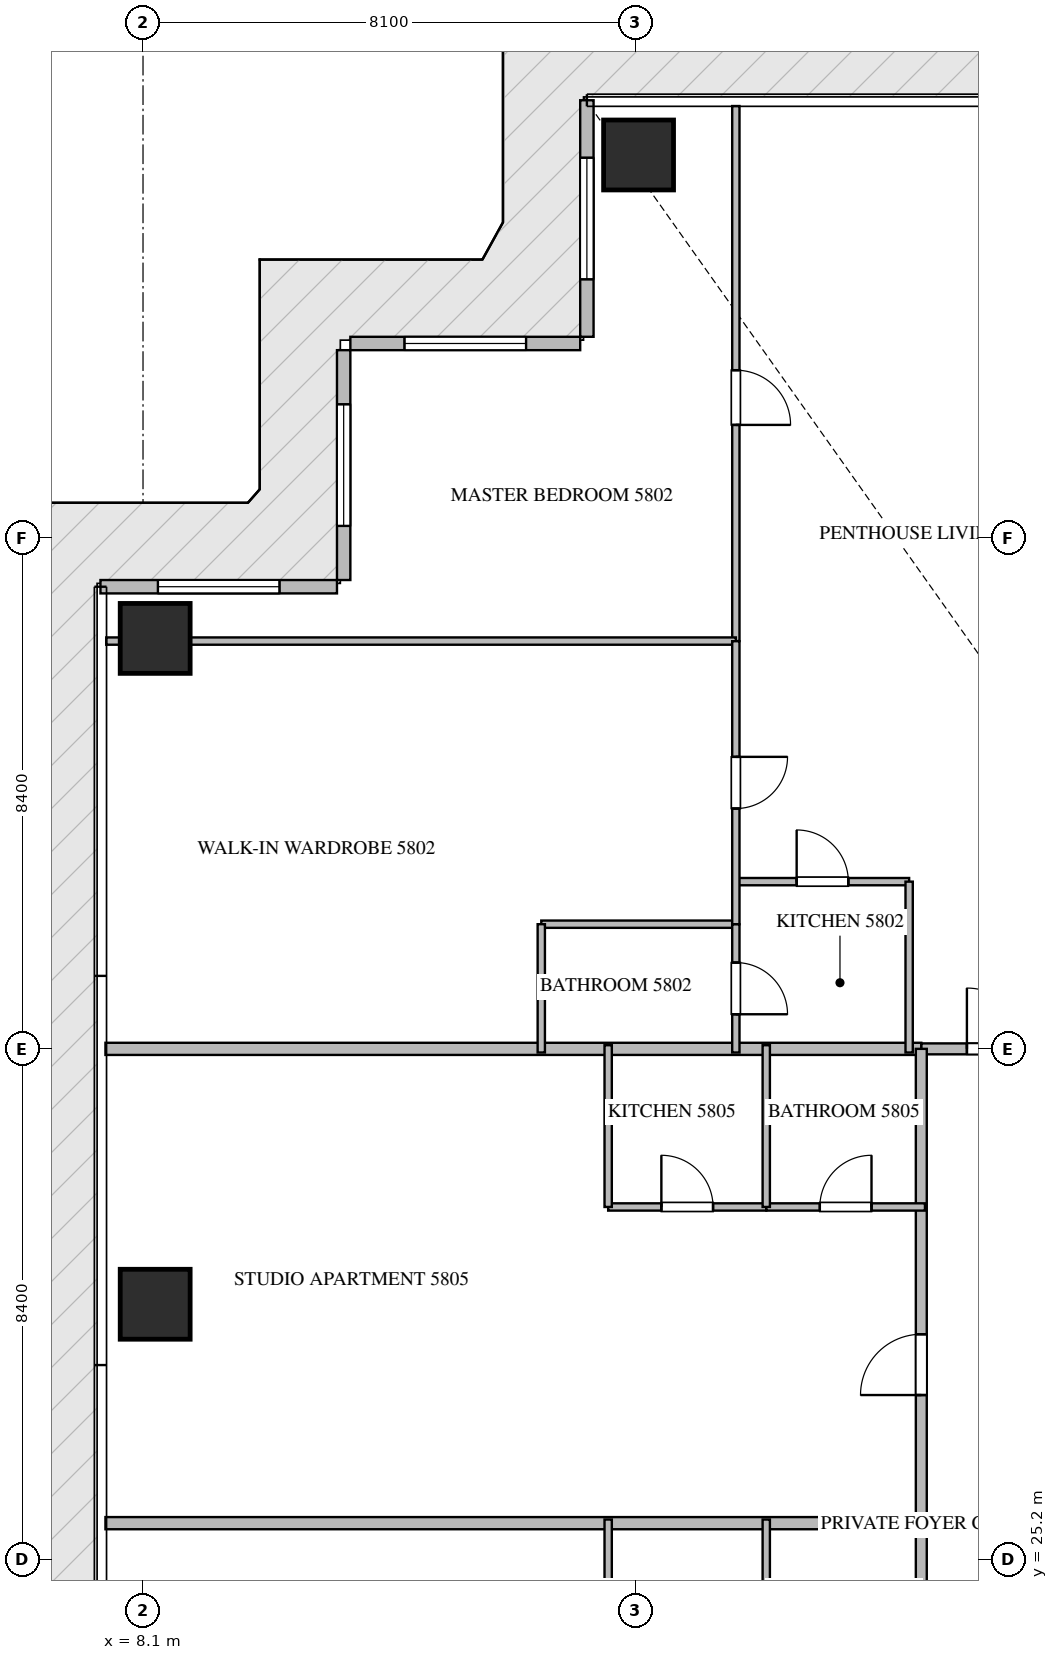
"""IFC4 building model, lengths in metres.
Left out: names, types, materials, properties, quantities, classifications, styles, units other than length and angle.
Written with IfcOpenShell. Run it as: python <this file> out.ifc"""

import sys

from ifc_helpers import new_model, si_unit, direction, frame, frame_2d, origin, origin_2d, place, context, subcontext, project, spatial, rectangle, extrude, source, transform, mapped, element, fill, save


model = new_model("IFC4")
c1 = context("Model", 3, precision=1e-05, world=origin(), true_north=direction((0.0, 1.0)))
c2 = subcontext(c1, "Body", "Model", "MODEL_VIEW")
j1 = project(units=[si_unit("LENGTHUNIT", "METRE"), si_unit("PLANEANGLEUNIT", "RADIAN")], contexts=[c1])
p1 = place(None, origin())
s1 = spatial("IfcSite", under=j1, at=p1, CompositionType="ELEMENT")
p2 = place(p1, origin())
s2 = spatial("IfcBuilding", under=s1, at=p2, CompositionType="ELEMENT")
p3 = place(p2, frame((0.0, 0.0, 233.55)))
s3 = spatial("IfcBuildingStorey", under=s2, at=p3, CompositionType="ELEMENT", Elevation=233.55)
m1 = source(origin(), c2, "Body", "SweptSolid", [
    extrude(rectangle(XDim=1.15, YDim=1.15, at=origin_2d()), origin(), (0.0, 0.0, 1.0), 3.85),
])
for number, where, z_axis, x_axis in (
    (1, (16.25, 48.3, -0.26), (0.0, 0.0, 1.0), (1.0, 0.0, 0.0)),
    (2, (8.3, 29.4, -0.26), (0.0, 0.0, 1.0), (1.0, 0.0, 0.0)),
    (3, (8.3, 40.35, -0.26), (0.0, 0.0, 1.0), (1.0, 0.0, 0.0)),
):
    element("IfcColumn", number, at=place(p3, frame(where, z_axis=z_axis, x_axis=x_axis)), inside=s3, PredefinedType="COLUMN", context=c2, shape_type="MappedRepresentation", body=[
        mapped(m1, transform((0.0, 0.0, 0.0), scale=1.0)),
    ])
p4 = place(p3, frame((15.4, 49.2, 0.0), z_axis=(0.0, 0.0, 1.0), x_axis=(0.0, -1.0, 0.0)))
e4 = element("IfcWall", 4, at=p4, inside=s3, PredefinedType="ELEMENTEDWALL", context=c2, shape_type="SweptSolid", body=[
    extrude(rectangle(XDim=3.89, YDim=0.22, at=frame_2d((1.945, 0.0))), origin(), (0.0, 0.0, 1.0), 3.575),
])
p5 = place(p4, frame((0.945, 0.0, 0.65)))
e5 = element("IfcOpeningElement", 5, at=p5, cuts=e4, PredefinedType="OPENING", context=c2, shape_type="SweptSolid", body=[
    extrude(rectangle(XDim=2.0, YDim=2.2, at=frame_2d((1.0, 1.1))), frame((0.0, 0.12, 0.0), z_axis=(0.0, -1.0, 0.0), x_axis=(1.0, 0.0, 0.0)), (0.0, 0.0, 1.0), 0.24),
])
p6 = place(p3, frame((15.29, 45.2, 0.0), z_axis=(0.0, 0.0, 1.0), x_axis=(-1.0, 0.0, 0.0)))
e6 = element("IfcWall", 6, at=p6, inside=s3, PredefinedType="ELEMENTEDWALL", context=c2, shape_type="SweptSolid", body=[
    extrude(rectangle(XDim=3.78, YDim=0.22, at=frame_2d((1.89, 0.0))), origin(), (0.0, 0.0, 1.0), 3.575),
])
p7 = place(p6, frame((0.89, 0.0, 0.65)))
e7 = element("IfcOpeningElement", 7, at=p7, cuts=e6, PredefinedType="OPENING", context=c2, shape_type="SweptSolid", body=[
    extrude(rectangle(XDim=2.0, YDim=2.2, at=frame_2d((1.0, 1.1))), frame((0.0, 0.12, 0.0), z_axis=(0.0, -1.0, 0.0), x_axis=(1.0, 0.0, 0.0)), (0.0, 0.0, 1.0), 0.24),
])
p8 = place(p3, frame((11.4, 45.09, 0.0), z_axis=(0.0, 0.0, 1.0), x_axis=(0.0, -1.0, 0.0)))
e8 = element("IfcWall", 8, at=p8, inside=s3, PredefinedType="ELEMENTEDWALL", context=c2, shape_type="SweptSolid", body=[
    extrude(rectangle(XDim=3.78, YDim=0.22, at=frame_2d((1.89, 0.0))), origin(), (0.0, 0.0, 1.0), 3.575),
])
p9 = place(p8, frame((0.89, 0.0, 0.65)))
e9 = element("IfcOpeningElement", 9, at=p9, cuts=e8, PredefinedType="OPENING", context=c2, shape_type="SweptSolid", body=[
    extrude(rectangle(XDim=2.0, YDim=2.2, at=frame_2d((1.0, 1.1))), frame((0.0, 0.12, 0.0), z_axis=(0.0, -1.0, 0.0), x_axis=(1.0, 0.0, 0.0)), (0.0, 0.0, 1.0), 0.24),
])
p10 = place(p3, frame((11.29, 41.2, 0.0), z_axis=(0.0, 0.0, 1.0), x_axis=(-1.0, 0.0, 0.0)))
e10 = element("IfcWall", 10, at=p10, inside=s3, PredefinedType="ELEMENTEDWALL", context=c2, shape_type="SweptSolid", body=[
    extrude(rectangle(XDim=3.89, YDim=0.22, at=frame_2d((1.945, 0.0))), origin(), (0.0, 0.0, 1.0), 3.575),
])
p11 = place(p10, frame((0.945, 0.0, 0.65)))
e11 = element("IfcOpeningElement", 11, at=p11, cuts=e10, PredefinedType="OPENING", context=c2, shape_type="SweptSolid", body=[
    extrude(rectangle(XDim=2.0, YDim=2.2, at=frame_2d((1.0, 1.1))), frame((0.0, 0.12, 0.0), z_axis=(0.0, -1.0, 0.0), x_axis=(1.0, 0.0, 0.0)), (0.0, 0.0, 1.0), 0.24),
])
p12 = place(p3, frame((7.482, 25.8, 0.0), z_axis=(0.0, 0.0, 1.0), x_axis=(1.0, 0.0, 0.0)))
e12 = element("IfcWall", 12, at=p12, inside=s3, PredefinedType="PARTITIONING", context=c2, shape_type="SweptSolid", body=[
    extrude(rectangle(XDim=13.538, YDim=0.2, at=frame_2d((6.769, 0.0))), origin(), (0.0, 0.0, 1.0), 3.59),
])
p13 = place(p3, frame((7.482, 33.6, 0.0), z_axis=(0.0, 0.0, 1.0), x_axis=(1.0, 0.0, 0.0)))
e13 = element("IfcWall", 13, at=p13, inside=s3, PredefinedType="PARTITIONING", context=c2, shape_type="SweptSolid", body=[
    extrude(rectangle(XDim=13.418, YDim=0.2, at=frame_2d((6.709, 0.0))), origin(), (0.0, 0.0, 1.0), 3.59),
])
p14 = place(p3, frame((20.902, 33.6, 0.0), z_axis=(0.0, 0.0, 1.0), x_axis=(1.0, 0.0, 0.0)))
e14 = element("IfcWall", 14, at=p14, inside=s3, PredefinedType="PARTITIONING", context=c2, shape_type="SweptSolid", body=[
    extrude(rectangle(XDim=2.496, YDim=0.18, at=frame_2d((1.248, 0.0))), origin(), (0.0, 0.0, 1.0), 3.59),
])
p15 = place(p14, frame((0.748, 0.0, 0.0)))
e15 = element("IfcOpeningElement", 15, at=p15, cuts=e14, PredefinedType="OPENING", context=c2, shape_type="SweptSolid", body=[
    extrude(rectangle(XDim=1.0, YDim=2.15, at=frame_2d((0.5, 1.075))), frame((0.0, 0.1, 0.0), z_axis=(0.0, -1.0, 0.0), x_axis=(1.0, 0.0, 0.0)), (0.0, 0.0, 1.0), 0.2),
])
p16 = place(p3, frame((20.9, 16.8, 0.0), z_axis=(0.0, 0.0, 1.0), x_axis=(0.0, 1.0, 0.0)))
e16 = element("IfcWall", 16, at=p16, inside=s3, PredefinedType="PARTITIONING", context=c2, shape_type="SweptSolid", body=[
    extrude(rectangle(XDim=16.8, YDim=0.18, at=frame_2d((8.4, 0.0))), origin(), (0.0, 0.0, 1.0), 3.59),
])
p17 = place(p16, frame((2.67, 0.0, 0.0)))
e17 = element("IfcOpeningElement", 17, at=p17, cuts=e16, PredefinedType="OPENING", context=c2, shape_type="SweptSolid", body=[
    extrude(rectangle(XDim=1.0, YDim=2.15, at=frame_2d((0.5, 1.075))), frame((0.0, 0.1, 0.0), z_axis=(0.0, -1.0, 0.0), x_axis=(1.0, 0.0, 0.0)), (0.0, 0.0, 1.0), 0.2),
])
p18 = place(p16, frame((11.107, 0.0, 0.0)))
e18 = element("IfcOpeningElement", 18, at=p18, cuts=e16, PredefinedType="OPENING", context=c2, shape_type="SweptSolid", body=[
    extrude(rectangle(XDim=1.0, YDim=2.15, at=frame_2d((0.5, 1.075))), frame((0.0, 0.1, 0.0), z_axis=(0.0, -1.0, 0.0), x_axis=(1.0, 0.0, 0.0)), (0.0, 0.0, 1.0), 0.2),
])
p19 = place(p3, frame((17.85, 36.35, 0.0), z_axis=(0.0, 0.0, 1.0), x_axis=(1.0, 0.0, 0.0)))
e19 = element("IfcWall", 19, at=p19, inside=s3, PredefinedType="PARTITIONING", context=c2, shape_type="SweptSolid", body=[
    extrude(rectangle(XDim=2.85, YDim=0.12, at=frame_2d((1.425, 0.0))), origin(), (0.0, 0.0, 1.0), 3.59),
])
p20 = place(p19, frame((1.0, 0.0, 0.0)))
e20 = element("IfcOpeningElement", 20, at=p20, cuts=e19, PredefinedType="OPENING", context=c2, shape_type="SweptSolid", body=[
    extrude(rectangle(XDim=0.85, YDim=2.1, at=frame_2d((0.425, 1.05))), frame((0.0, 0.07, 0.0), z_axis=(0.0, -1.0, 0.0), x_axis=(1.0, 0.0, 0.0)), (0.0, 0.0, 1.0), 0.14),
])
p21 = place(p3, frame((20.7, 36.35, 0.0), z_axis=(0.0, 0.0, 1.0), x_axis=(0.0, -1.0, 0.0)))
e21 = element("IfcWall", 21, at=p21, inside=s3, PredefinedType="PARTITIONING", context=c2, shape_type="SweptSolid", body=[
    extrude(rectangle(XDim=2.81, YDim=0.12, at=frame_2d((1.405, 0.0))), origin(), (0.0, 0.0, 1.0), 3.59),
])
p22 = place(p3, frame((17.85, 49.105, 0.0), z_axis=(0.0, 0.0, 1.0), x_axis=(0.0, -1.0, 0.0)))
e22 = element("IfcWall", 22, at=p22, inside=s3, PredefinedType="PARTITIONING", context=c2, shape_type="SweptSolid", body=[
    extrude(rectangle(XDim=8.799, YDim=0.12, at=frame_2d((4.399, 0.0))), origin(), (0.0, 0.0, 1.0), 3.59),
])
p23 = place(p22, frame((4.344, 0.0, 0.0)))
e23 = element("IfcOpeningElement", 23, at=p23, cuts=e22, PredefinedType="OPENING", context=c2, shape_type="SweptSolid", body=[
    extrude(rectangle(XDim=0.9, YDim=2.1, at=frame_2d((0.45, 1.05))), frame((0.0, 0.07, 0.0), z_axis=(0.0, -1.0, 0.0), x_axis=(1.0, 0.0, 0.0)), (0.0, 0.0, 1.0), 0.14),
])
p24 = place(p3, frame((7.495, 40.306, 0.0), z_axis=(0.0, 0.0, 1.0), x_axis=(1.0, 0.0, 0.0)))
e24 = element("IfcWall", 24, at=p24, inside=s3, PredefinedType="PARTITIONING", context=c2, shape_type="SweptSolid", body=[
    extrude(rectangle(XDim=10.355, YDim=0.12, at=frame_2d((5.177, 0.0))), origin(), (0.0, 0.0, 1.0), 3.122),
])
p25 = place(p3, frame((14.65, 35.65, 0.0), z_axis=(0.0, 0.0, 1.0), x_axis=(1.0, 0.0, 0.0)))
e25 = element("IfcWall", 25, at=p25, inside=s3, PredefinedType="PARTITIONING", context=c2, shape_type="SweptSolid", body=[
    extrude(rectangle(XDim=3.2, YDim=0.12, at=frame_2d((1.6, 0.0))), origin(), (0.0, 0.0, 1.0), 3.59),
])
p26 = place(p3, frame((14.65, 35.65, 0.0), z_axis=(0.0, 0.0, 1.0), x_axis=(0.0, -1.0, 0.0)))
e26 = element("IfcWall", 26, at=p26, inside=s3, PredefinedType="PARTITIONING", context=c2, shape_type="SweptSolid", body=[
    extrude(rectangle(XDim=2.11, YDim=0.12, at=frame_2d((1.055, 0.0))), origin(), (0.0, 0.0, 1.0), 3.59),
])
p27 = place(p3, frame((17.85, 40.304, 0.0), z_axis=(0.0, 0.0, 1.0), x_axis=(0.0, -1.0, 0.0)))
e27 = element("IfcWall", 27, at=p27, inside=s3, PredefinedType="PARTITIONING", context=c2, shape_type="SweptSolid", body=[
    extrude(rectangle(XDim=4.654, YDim=0.12, at=frame_2d((2.327, 0.0))), origin(), (0.0, 0.0, 1.0), 3.59),
])
p28 = place(p27, frame((1.902, 0.0, 0.0)))
e28 = element("IfcOpeningElement", 28, at=p28, cuts=e27, PredefinedType="OPENING", context=c2, shape_type="SweptSolid", body=[
    extrude(rectangle(XDim=0.85, YDim=2.1, at=frame_2d((0.425, 1.05))), frame((0.0, 0.07, 0.0), z_axis=(0.0, -1.0, 0.0), x_axis=(1.0, 0.0, 0.0)), (0.0, 0.0, 1.0), 0.14),
])
p29 = place(p3, frame((17.85, 35.648, 0.0), z_axis=(0.0, 0.0, 1.0), x_axis=(0.0, -1.0, 0.0)))
e29 = element("IfcWall", 29, at=p29, inside=s3, PredefinedType="PARTITIONING", context=c2, shape_type="SweptSolid", body=[
    extrude(rectangle(XDim=2.108, YDim=0.12, at=frame_2d((1.054, 0.0))), origin(), (0.0, 0.0, 1.0), 3.59),
])
p30 = place(p29, frame((0.629, 0.0, 0.0)))
e30 = element("IfcOpeningElement", 30, at=p30, cuts=e29, PredefinedType="OPENING", context=c2, shape_type="SweptSolid", body=[
    extrude(rectangle(XDim=0.85, YDim=2.1, at=frame_2d((0.425, 1.05))), frame((0.0, 0.07, 0.0), z_axis=(0.0, -1.0, 0.0), x_axis=(1.0, 0.0, 0.0)), (0.0, 0.0, 1.0), 0.14),
])
for number, where, z_axis, x_axis in (
    (31, (18.35, 23.05, 0.0), (0.0, 0.0, 1.0), (0.0, 1.0, 0.0)),
    (32, (15.75, 23.05, 0.0), (0.0, 0.0, 1.0), (0.0, 1.0, 0.0)),
):
    element("IfcWall", number, at=place(p3, frame(where, z_axis=z_axis, x_axis=x_axis)), inside=s3, PredefinedType="PARTITIONING", context=c2, shape_type="SweptSolid", body=[
        extrude(rectangle(XDim=2.81, YDim=0.12, at=frame_2d((1.405, 0.0))), origin(), (0.0, 0.0, 1.0), 3.59),
    ])
p31 = place(p3, frame((15.75, 31.0, 0.0), z_axis=(0.0, 0.0, 1.0), x_axis=(1.0, 0.0, 0.0)))
e33 = element("IfcWall", 33, at=p31, inside=s3, PredefinedType="PARTITIONING", context=c2, shape_type="SweptSolid", body=[
    extrude(rectangle(XDim=2.6, YDim=0.12, at=frame_2d((1.3, 0.0))), origin(), (0.0, 0.0, 1.0), 3.59),
])
p32 = place(p31, frame((0.875, 0.0, 0.0)))
e34 = element("IfcOpeningElement", 34, at=p32, cuts=e33, PredefinedType="OPENING", context=c2, shape_type="SweptSolid", body=[
    extrude(rectangle(XDim=0.85, YDim=2.1, at=frame_2d((0.425, 1.05))), frame((0.0, 0.07, 0.0), z_axis=(0.0, -1.0, 0.0), x_axis=(1.0, 0.0, 0.0)), (0.0, 0.0, 1.0), 0.14),
])
p33 = place(p3, frame((18.352, 31.0, 0.0), z_axis=(0.0, 0.0, 1.0), x_axis=(1.0, 0.0, 0.0)))
e35 = element("IfcWall", 35, at=p33, inside=s3, PredefinedType="PARTITIONING", context=c2, shape_type="SweptSolid", body=[
    extrude(rectangle(XDim=2.608, YDim=0.12, at=frame_2d((1.304, 0.0))), origin(), (0.0, 0.0, 1.0), 3.59),
])
p34 = place(p33, frame((0.879, 0.0, 0.0)))
e36 = element("IfcOpeningElement", 36, at=p34, cuts=e35, PredefinedType="OPENING", context=c2, shape_type="SweptSolid", body=[
    extrude(rectangle(XDim=0.85, YDim=2.1, at=frame_2d((0.425, 1.05))), frame((0.0, 0.07, 0.0), z_axis=(0.0, -1.0, 0.0), x_axis=(1.0, 0.0, 0.0)), (0.0, 0.0, 1.0), 0.14),
])
for number, where, z_axis, x_axis in (
    (37, (18.35, 31.0, 0.0), (0.0, 0.0, 1.0), (0.0, 1.0, 0.0)),
    (38, (15.75, 31.0, 0.0), (0.0, 0.0, 1.0), (0.0, 1.0, 0.0)),
):
    element("IfcWall", number, at=place(p3, frame(where, z_axis=z_axis, x_axis=x_axis)), inside=s3, PredefinedType="PARTITIONING", context=c2, shape_type="SweptSolid", body=[
        extrude(rectangle(XDim=2.66, YDim=0.12, at=frame_2d((1.33, 0.0))), origin(), (0.0, 0.0, 1.0), 3.59),
    ])
m2 = source(origin(), c2, "Body", "SweptSolid", [
    extrude(rectangle(XDim=2.0, YDim=2.2, at=frame_2d((1.0, 1.1))), frame((0.0, 0.03, 0.0), z_axis=(0.0, -1.0, 0.0), x_axis=(1.0, 0.0, 0.0)), (0.0, 0.0, 1.0), 0.06),
])
p35 = place(p5, origin())
e39 = element("IfcWindow", 39, at=p35, inside=s3, PartitioningType="SINGLE_PANEL", PredefinedType="WINDOW", context=c2, shape_type="MappedRepresentation", body=[
    mapped(m2, transform((0.0, 0.0, 0.0), scale=1.0)),
])
fill(e5, e39)
p36 = place(p7, origin())
e40 = element("IfcWindow", 40, at=p36, inside=s3, PartitioningType="SINGLE_PANEL", PredefinedType="WINDOW", context=c2, shape_type="MappedRepresentation", body=[
    mapped(m2, transform((0.0, 0.0, 0.0), scale=1.0)),
])
fill(e7, e40)
p37 = place(p9, origin())
e41 = element("IfcWindow", 41, at=p37, inside=s3, PartitioningType="SINGLE_PANEL", PredefinedType="WINDOW", context=c2, shape_type="MappedRepresentation", body=[
    mapped(m2, transform((0.0, 0.0, 0.0), scale=1.0)),
])
fill(e9, e41)
p38 = place(p11, origin())
e42 = element("IfcWindow", 42, at=p38, inside=s3, PartitioningType="SINGLE_PANEL", PredefinedType="WINDOW", context=c2, shape_type="MappedRepresentation", body=[
    mapped(m2, transform((0.0, 0.0, 0.0), scale=1.0)),
])
fill(e11, e42)
m3 = source(origin(), c2, "Body", "SweptSolid", [
    extrude(rectangle(XDim=1.0, YDim=2.15, at=frame_2d((0.5, 1.075))), frame((0.0, 0.025, 0.0), z_axis=(0.0, -1.0, 0.0), x_axis=(1.0, 0.0, 0.0)), (0.0, 0.0, 1.0), 0.05),
])
p39 = place(p15, origin())
e43 = element("IfcDoor", 43, at=p39, inside=s3, OperationType="SINGLE_SWING_LEFT", PredefinedType="DOOR", context=c2, shape_type="MappedRepresentation", body=[
    mapped(m3, transform((0.0, 0.0, 0.0), scale=1.0)),
])
fill(e15, e43)
p40 = place(p18, origin())
e44 = element("IfcDoor", 44, at=p40, inside=s3, OperationType="SINGLE_SWING_LEFT", PredefinedType="DOOR", context=c2, shape_type="MappedRepresentation", body=[
    mapped(m3, transform((0.0, 0.0, 0.0), scale=1.0)),
])
fill(e18, e44)
m4 = source(origin(), c2, "Body", "SweptSolid", [
    extrude(rectangle(XDim=0.85, YDim=2.1, at=frame_2d((0.425, 1.05))), frame((0.0, 0.025, 0.0), z_axis=(0.0, -1.0, 0.0), x_axis=(1.0, 0.0, 0.0)), (0.0, 0.0, 1.0), 0.05),
])
p41 = place(p20, origin())
e45 = element("IfcDoor", 45, at=p41, inside=s3, OperationType="SINGLE_SWING_LEFT", PredefinedType="DOOR", context=c2, shape_type="MappedRepresentation", body=[
    mapped(m4, transform((0.0, 0.0, 0.0), scale=1.0)),
])
fill(e20, e45)
m5 = source(origin(), c2, "Body", "SweptSolid", [
    extrude(rectangle(XDim=0.9, YDim=2.1, at=frame_2d((0.45, 1.05))), frame((0.0, 0.025, 0.0), z_axis=(0.0, -1.0, 0.0), x_axis=(1.0, 0.0, 0.0)), (0.0, 0.0, 1.0), 0.05),
])
p42 = place(p23, origin())
e46 = element("IfcDoor", 46, at=p42, inside=s3, OperationType="SINGLE_SWING_RIGHT", PredefinedType="DOOR", context=c2, shape_type="MappedRepresentation", body=[
    mapped(m5, transform((0.0, 0.0, 0.0), scale=1.0)),
])
fill(e23, e46)
p43 = place(p28, origin())
e47 = element("IfcDoor", 47, at=p43, inside=s3, OperationType="SINGLE_SWING_LEFT", PredefinedType="DOOR", context=c2, shape_type="MappedRepresentation", body=[
    mapped(m4, transform((0.0, 0.0, 0.0), scale=1.0)),
])
fill(e28, e47)
p44 = place(p30, origin())
e48 = element("IfcDoor", 48, at=p44, inside=s3, OperationType="SINGLE_SWING_RIGHT", PredefinedType="DOOR", context=c2, shape_type="MappedRepresentation", body=[
    mapped(m4, transform((0.0, 0.0, 0.0), scale=1.0)),
])
fill(e30, e48)
p45 = place(p32, origin())
e49 = element("IfcDoor", 49, at=p45, inside=s3, OperationType="SINGLE_SWING_LEFT", PredefinedType="DOOR", context=c2, shape_type="MappedRepresentation", body=[
    mapped(m4, transform((0.0, 0.0, 0.0), scale=1.0)),
])
fill(e34, e49)
p46 = place(p34, origin())
e50 = element("IfcDoor", 50, at=p46, inside=s3, OperationType="SINGLE_SWING_RIGHT", PredefinedType="DOOR", context=c2, shape_type="MappedRepresentation", body=[
    mapped(m4, transform((0.0, 0.0, 0.0), scale=1.0)),
])
fill(e36, e50)
save(model, sys.argv[1])
